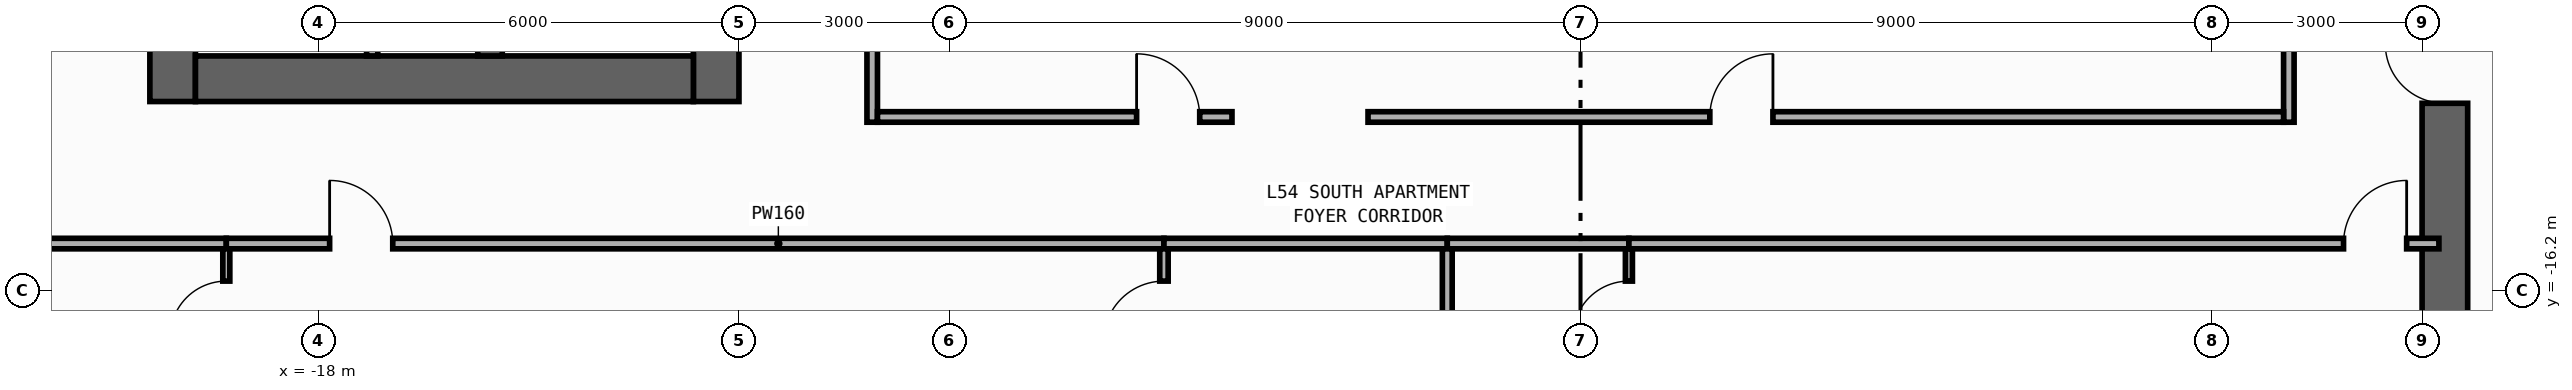
"""IFC4 building model, lengths in metres.
Left out: names, types, materials, properties, quantities, classifications, styles, units other than length and angle.
Written with IfcOpenShell. Run it as: python <this file> out.ifc"""

import sys

from ifc_helpers import new_model, si_unit, direction, frame, frame_2d, origin, place, context, subcontext, project, spatial, rectangle, extrude, element, fill, save


model = new_model("IFC4")
c1 = context("Model", 3, precision=1e-05, world=origin(), true_north=direction((0.0, 1.0)))
c2 = subcontext(c1, "Body", "Model", "MODEL_VIEW")
j1 = project(units=[si_unit("LENGTHUNIT", "METRE"), si_unit("PLANEANGLEUNIT", "RADIAN")], contexts=[c1])
p1 = place(None, origin())
s1 = spatial("IfcSite", under=j1, at=p1, CompositionType="ELEMENT")
p2 = place(p1, origin())
s2 = spatial("IfcBuilding", under=s1, at=p2, CompositionType="ELEMENT")
p3 = place(p2, frame((0.0, 0.0, 233.2)))
s3 = spatial("IfcBuildingStorey", under=s2, at=p3, CompositionType="ELEMENT", Elevation=233.2)
p4 = place(p3, frame((-20.075, -13.5, 0.0), z_axis=(0.0, 0.0, 1.0), x_axis=(0.0, 1.0, 0.0)))
e1 = element("IfcWall", 1, at=p4, inside=s3, PredefinedType="SHEAR", context=c2, shape_type="SweptSolid", body=[
    extrude(rectangle(XDim=27.0, YDim=0.65, at=frame_2d((13.5, 0.0))), origin(), (0.0, 0.0, 1.0), 3.34),
])
p5 = place(p3, frame((-12.325, -13.5, 0.0), z_axis=(0.0, 0.0, 1.0), x_axis=(0.0, 1.0, 0.0)))
e2 = element("IfcWall", 2, at=p5, inside=s3, PredefinedType="SHEAR", context=c2, shape_type="SweptSolid", body=[
    extrude(rectangle(XDim=27.0, YDim=0.65, at=frame_2d((13.5, 0.0))), origin(), (0.0, 0.0, 1.0), 3.34),
])
p6 = place(p5, frame((15.175, 0.0, 0.0)))
e3 = element("IfcOpeningElement", 3, at=p6, cuts=e2, PredefinedType="OPENING", context=c2, shape_type="SweptSolid", body=[
    extrude(rectangle(XDim=0.85, YDim=2.1, at=frame_2d((0.425, 1.05))), frame((0.0, 0.335, 0.0), z_axis=(0.0, -1.0, 0.0), x_axis=(1.0, 0.0, 0.0)), (0.0, 0.0, 1.0), 0.67),
])
p7 = place(p5, frame((21.275, 0.0, 0.0)))
e4 = element("IfcOpeningElement", 4, at=p7, cuts=e2, PredefinedType="OPENING", context=c2, shape_type="SweptSolid", body=[
    extrude(rectangle(XDim=0.85, YDim=2.1, at=frame_2d((0.425, 1.05))), frame((0.0, 0.335, 0.0), z_axis=(0.0, -1.0, 0.0), x_axis=(1.0, 0.0, 0.0)), (0.0, 0.0, 1.0), 0.67),
])
p8 = place(p5, frame((4.275, 0.0, 0.0)))
e5 = element("IfcOpeningElement", 5, at=p8, cuts=e2, PredefinedType="OPENING", context=c2, shape_type="SweptSolid", body=[
    extrude(rectangle(XDim=0.85, YDim=2.1, at=frame_2d((0.425, 1.05))), frame((0.0, 0.335, 0.0), z_axis=(0.0, -1.0, 0.0), x_axis=(1.0, 0.0, 0.0)), (0.0, 0.0, 1.0), 0.67),
])
p9 = place(p5, frame((10.275, 0.0, 0.0)))
e6 = element("IfcOpeningElement", 6, at=p9, cuts=e2, PredefinedType="OPENING", context=c2, shape_type="SweptSolid", body=[
    extrude(rectangle(XDim=0.85, YDim=2.1, at=frame_2d((0.425, 1.05))), frame((0.0, 0.335, 0.0), z_axis=(0.0, -1.0, 0.0), x_axis=(1.0, 0.0, 0.0)), (0.0, 0.0, 1.0), 0.67),
])
p10 = place(p5, frame((12.725, 0.0, 0.0)))
e7 = element("IfcOpeningElement", 7, at=p10, cuts=e2, PredefinedType="OPENING", context=c2, shape_type="SweptSolid", body=[
    extrude(rectangle(XDim=1.15, YDim=2.2, at=frame_2d((0.575, 1.1))), frame((0.0, 0.335, 0.0), z_axis=(0.0, -1.0, 0.0), x_axis=(1.0, 0.0, 0.0)), (0.0, 0.0, 1.0), 0.67),
])
p11 = place(p5, frame((1.625, 0.0, 0.0)))
e8 = element("IfcOpeningElement", 8, at=p11, cuts=e2, PredefinedType="OPENING", context=c2, shape_type="SweptSolid", body=[
    extrude(rectangle(XDim=0.85, YDim=2.1, at=frame_2d((0.425, 1.05))), frame((0.0, 0.335, 0.0), z_axis=(0.0, -1.0, 0.0), x_axis=(1.0, 0.0, 0.0)), (0.0, 0.0, 1.0), 0.67),
])
p12 = place(p3, frame((-19.75, -13.175, 0.0), z_axis=(0.0, 0.0, 1.0), x_axis=(1.0, 0.0, 0.0)))
e9 = element("IfcWall", 9, at=p12, inside=s3, PredefinedType="SHEAR", context=c2, shape_type="SweptSolid", body=[
    extrude(rectangle(XDim=7.1, YDim=0.65, at=frame_2d((3.55, 0.0))), origin(), (0.0, 0.0, 1.0), 3.34),
])
p13 = place(p3, frame((-15.55, -12.85, 0.0), z_axis=(0.0, 0.0, 1.0), x_axis=(0.0, 1.0, 0.0)))
e10 = element("IfcWall", 10, at=p13, inside=s3, PredefinedType="SHEAR", context=c2, shape_type="SweptSolid", body=[
    extrude(rectangle(XDim=25.7, YDim=0.35, at=frame_2d((12.85, 0.0))), origin(), (0.0, 0.0, 1.0), 3.34),
])
p14 = place(p13, frame((12.075, 0.0, 0.0)))
e11 = element("IfcOpeningElement", 11, at=p14, cuts=e10, PredefinedType="OPENING", context=c2, shape_type="SweptSolid", body=[
    extrude(rectangle(XDim=1.15, YDim=2.2, at=frame_2d((0.575, 1.1))), frame((0.0, 0.185, 0.0), z_axis=(0.0, -1.0, 0.0), x_axis=(1.0, 0.0, 0.0)), (0.0, 0.0, 1.0), 0.37),
])
p15 = place(p13, frame((0.975, 0.0, 0.0)))
e12 = element("IfcOpeningElement", 12, at=p15, cuts=e10, PredefinedType="OPENING", context=c2, shape_type="SweptSolid", body=[
    extrude(rectangle(XDim=0.85, YDim=2.1, at=frame_2d((0.425, 1.05))), frame((0.0, 0.185, 0.0), z_axis=(0.0, -1.0, 0.0), x_axis=(1.0, 0.0, 0.0)), (0.0, 0.0, 1.0), 0.37),
])
p16 = place(p3, frame((12.325, -19.8, 0.0), z_axis=(0.0, 0.0, 1.0), x_axis=(0.0, 1.0, 0.0)))
e13 = element("IfcWall", 13, at=p16, inside=s3, PredefinedType="SHEAR", context=c2, shape_type="SweptSolid", body=[
    extrude(rectangle(XDim=27.0, YDim=0.65, at=frame_2d((13.5, 0.0))), origin(), (0.0, 0.0, 1.0), 3.34),
])
p17 = place(p16, frame((23.05, 0.0, 0.0)))
e14 = element("IfcOpeningElement", 14, at=p17, cuts=e13, PredefinedType="OPENING", context=c2, shape_type="SweptSolid", body=[
    extrude(rectangle(XDim=1.1, YDim=2.2, at=frame_2d((0.55, 1.1))), frame((0.0, 0.335, 0.0), z_axis=(0.0, -1.0, 0.0), x_axis=(1.0, 0.0, 0.0)), (0.0, 0.0, 1.0), 0.67),
])
p18 = place(p16, frame((19.85, 0.0, 0.0)))
e15 = element("IfcOpeningElement", 15, at=p18, cuts=e13, PredefinedType="OPENING", context=c2, shape_type="SweptSolid", body=[
    extrude(rectangle(XDim=1.1, YDim=2.2, at=frame_2d((0.55, 1.1))), frame((0.0, 0.335, 0.0), z_axis=(0.0, -1.0, 0.0), x_axis=(1.0, 0.0, 0.0)), (0.0, 0.0, 1.0), 0.67),
])
p19 = place(p16, frame((16.65, 0.0, 0.0)))
e16 = element("IfcOpeningElement", 16, at=p19, cuts=e13, PredefinedType="OPENING", context=c2, shape_type="SweptSolid", body=[
    extrude(rectangle(XDim=1.1, YDim=2.2, at=frame_2d((0.55, 1.1))), frame((0.0, 0.335, 0.0), z_axis=(0.0, -1.0, 0.0), x_axis=(1.0, 0.0, 0.0)), (0.0, 0.0, 1.0), 0.67),
])
p20 = place(p16, frame((6.275, 0.0, 0.0)))
e17 = element("IfcOpeningElement", 17, at=p20, cuts=e13, PredefinedType="OPENING", context=c2, shape_type="SweptSolid", body=[
    extrude(rectangle(XDim=0.85, YDim=2.1, at=frame_2d((0.425, 1.05))), frame((0.0, 0.335, 0.0), z_axis=(0.0, -1.0, 0.0), x_axis=(1.0, 0.0, 0.0)), (0.0, 0.0, 1.0), 0.67),
])
p21 = place(p16, frame((8.575, 0.0, 0.0)))
e18 = element("IfcOpeningElement", 18, at=p21, cuts=e13, PredefinedType="OPENING", context=c2, shape_type="SweptSolid", body=[
    extrude(rectangle(XDim=0.85, YDim=2.1, at=frame_2d((0.425, 1.05))), frame((0.0, 0.335, 0.0), z_axis=(0.0, -1.0, 0.0), x_axis=(1.0, 0.0, 0.0)), (0.0, 0.0, 1.0), 0.67),
])
p22 = place(p16, frame((10.675, 0.0, 0.0)))
e19 = element("IfcOpeningElement", 19, at=p22, cuts=e13, PredefinedType="OPENING", context=c2, shape_type="SweptSolid", body=[
    extrude(rectangle(XDim=0.85, YDim=2.1, at=frame_2d((0.425, 1.05))), frame((0.0, 0.335, 0.0), z_axis=(0.0, -1.0, 0.0), x_axis=(1.0, 0.0, 0.0)), (0.0, 0.0, 1.0), 0.67),
])
p23 = place(p16, frame((12.725, 0.0, 0.0)))
e20 = element("IfcOpeningElement", 20, at=p23, cuts=e13, PredefinedType="OPENING", context=c2, shape_type="SweptSolid", body=[
    extrude(rectangle(XDim=1.15, YDim=2.2, at=frame_2d((0.575, 1.1))), frame((0.0, 0.335, 0.0), z_axis=(0.0, -1.0, 0.0), x_axis=(1.0, 0.0, 0.0)), (0.0, 0.0, 1.0), 0.67),
])
p24 = place(p16, frame((25.125, 0.0, 0.0)))
e21 = element("IfcOpeningElement", 21, at=p24, cuts=e13, PredefinedType="OPENING", context=c2, shape_type="SweptSolid", body=[
    extrude(rectangle(XDim=0.85, YDim=2.1, at=frame_2d((0.425, 1.05))), frame((0.0, 0.335, 0.0), z_axis=(0.0, -1.0, 0.0), x_axis=(1.0, 0.0, 0.0)), (0.0, 0.0, 1.0), 0.67),
])
p25 = place(p3, frame((-17.23, -12.85, 0.0), z_axis=(0.0, 0.0, 1.0), x_axis=(0.0, 1.0, 0.0)))
e22 = element("IfcWall", 22, at=p25, inside=s3, PredefinedType="PARTITIONING", context=c2, shape_type="SweptSolid", body=[
    extrude(rectangle(XDim=2.38, YDim=0.16, at=frame_2d((1.19, 0.0))), origin(), (0.0, 0.0, 1.0), 3.34),
])
p26 = place(p25, frame((0.46, 0.0, 0.0)))
e23 = element("IfcOpeningElement", 23, at=p26, cuts=e22, PredefinedType="OPENING", context=c2, shape_type="SweptSolid", body=[
    extrude(rectangle(XDim=0.85, YDim=2.1, at=frame_2d((0.425, 1.05))), frame((0.0, 0.09, 0.0), z_axis=(0.0, -1.0, 0.0), x_axis=(1.0, 0.0, 0.0)), (0.0, 0.0, 1.0), 0.18),
])
p27 = place(p3, frame((-10.1, -13.795, 0.0), z_axis=(0.0, 0.0, 1.0), x_axis=(0.0, 1.0, 0.0)))
e24 = element("IfcWall", 24, at=p27, inside=s3, PredefinedType="PARTITIONING", context=c2, shape_type="SweptSolid", body=[
    extrude(rectangle(XDim=9.005, YDim=0.15, at=frame_2d((4.502, 0.0))), origin(), (0.0, 0.0, 1.0), 3.34),
])
p28 = place(p27, frame((7.645, 0.0, 0.0)))
e25 = element("IfcOpeningElement", 25, at=p28, cuts=e24, PredefinedType="OPENING", context=c2, shape_type="SweptSolid", body=[
    extrude(rectangle(XDim=0.9, YDim=2.15, at=frame_2d((0.45, 1.075))), frame((0.0, 0.085, 0.0), z_axis=(0.0, -1.0, 0.0), x_axis=(1.0, 0.0, 0.0)), (0.0, 0.0, 1.0), 0.17),
])
p29 = place(p3, frame((10.1, -13.795, 0.0), z_axis=(0.0, 0.0, 1.0), x_axis=(0.0, 1.0, 0.0)))
e26 = element("IfcWall", 26, at=p29, inside=s3, PredefinedType="PARTITIONING", context=c2, shape_type="SweptSolid", body=[
    extrude(rectangle(XDim=6.375, YDim=0.15, at=frame_2d((3.188, 0.0))), origin(), (0.0, 0.0, 1.0), 3.34),
])
p30 = place(p29, frame((5.015, 0.0, 0.0)))
e27 = element("IfcOpeningElement", 27, at=p30, cuts=e26, PredefinedType="OPENING", context=c2, shape_type="SweptSolid", body=[
    extrude(rectangle(XDim=0.9, YDim=2.15, at=frame_2d((0.45, 1.075))), frame((0.0, 0.085, 0.0), z_axis=(0.0, -1.0, 0.0), x_axis=(1.0, 0.0, 0.0)), (0.0, 0.0, 1.0), 0.17),
])
p31 = place(p3, frame((-21.955, -15.525, 0.0), z_axis=(0.0, 0.0, 1.0), x_axis=(1.0, 0.0, 0.0)))
e28 = element("IfcWall", 28, at=p31, inside=s3, PredefinedType="PARTITIONING", context=c2, shape_type="SweptSolid", body=[
    extrude(rectangle(XDim=2.645, YDim=0.15, at=frame_2d((1.323, 0.0))), origin(), (0.0, 0.0, 1.0), 3.34),
])
p32 = place(p3, frame((-19.31, -15.525, 0.0), z_axis=(0.0, 0.0, 1.0), x_axis=(1.0, 0.0, 0.0)))
e29 = element("IfcWall", 29, at=p32, inside=s3, PredefinedType="PARTITIONING", context=c2, shape_type="SweptSolid", body=[
    extrude(rectangle(XDim=13.37, YDim=0.15, at=frame_2d((6.685, 0.0))), origin(), (0.0, 0.0, 1.0), 3.34),
])
p33 = place(p32, frame((1.473, 0.0, 0.0)))
e30 = element("IfcOpeningElement", 30, at=p33, cuts=e29, PredefinedType="OPENING", context=c2, shape_type="SweptSolid", body=[
    extrude(rectangle(XDim=0.9, YDim=2.15, at=frame_2d((0.45, 1.075))), frame((0.0, 0.085, 0.0), z_axis=(0.0, -1.0, 0.0), x_axis=(1.0, 0.0, 0.0)), (0.0, 0.0, 1.0), 0.17),
])
p34 = place(p3, frame((-5.94, -15.525, 0.0), z_axis=(0.0, 0.0, 1.0), x_axis=(1.0, 0.0, 0.0)))
e31 = element("IfcWall", 31, at=p34, inside=s3, PredefinedType="PARTITIONING", context=c2, shape_type="SweptSolid", body=[
    extrude(rectangle(XDim=4.04, YDim=0.15, at=frame_2d((2.02, 0.0))), origin(), (0.0, 0.0, 1.0), 3.34),
])
p35 = place(p3, frame((-1.9, -15.525, 0.0), z_axis=(0.0, 0.0, 1.0), x_axis=(1.0, 0.0, 0.0)))
e32 = element("IfcWall", 32, at=p35, inside=s3, PredefinedType="PARTITIONING", context=c2, shape_type="SweptSolid", body=[
    extrude(rectangle(XDim=2.59, YDim=0.15, at=frame_2d((1.295, 0.0))), origin(), (0.0, 0.0, 1.0), 3.34),
])
p36 = place(p3, frame((0.69, -15.525, 0.0), z_axis=(0.0, 0.0, 1.0), x_axis=(1.0, 0.0, 0.0)))
e33 = element("IfcWall", 33, at=p36, inside=s3, PredefinedType="PARTITIONING", context=c2, shape_type="SweptSolid", body=[
    extrude(rectangle(XDim=11.55, YDim=0.15, at=frame_2d((5.775, 0.0))), origin(), (0.0, 0.0, 1.0), 3.34),
])
p37 = place(p36, frame((10.19, 0.0, 0.0)))
e34 = element("IfcOpeningElement", 34, at=p37, cuts=e33, PredefinedType="OPENING", context=c2, shape_type="SweptSolid", body=[
    extrude(rectangle(XDim=0.9, YDim=2.15, at=frame_2d((0.45, 1.075))), frame((0.0, 0.085, 0.0), z_axis=(0.0, -1.0, 0.0), x_axis=(1.0, 0.0, 0.0)), (0.0, 0.0, 1.0), 0.17),
])
p38 = place(p3, frame((-10.025, -13.72, 0.0), z_axis=(0.0, 0.0, 1.0), x_axis=(1.0, 0.0, 0.0)))
e35 = element("IfcWall", 35, at=p38, inside=s3, PredefinedType="PARTITIONING", context=c2, shape_type="SweptSolid", body=[
    extrude(rectangle(XDim=5.055, YDim=0.15, at=frame_2d((2.527, 0.0))), origin(), (0.0, 0.0, 1.0), 3.34),
])
p39 = place(p38, frame((3.695, 0.0, 0.0)))
e36 = element("IfcOpeningElement", 36, at=p39, cuts=e35, PredefinedType="OPENING", context=c2, shape_type="SweptSolid", body=[
    extrude(rectangle(XDim=0.9, YDim=2.15, at=frame_2d((0.45, 1.075))), frame((0.0, 0.085, 0.0), z_axis=(0.0, -1.0, 0.0), x_axis=(1.0, 0.0, 0.0)), (0.0, 0.0, 1.0), 0.17),
])
p40 = place(p3, frame((-3.03, -13.72, 0.0), z_axis=(0.0, 0.0, 1.0), x_axis=(1.0, 0.0, 0.0)))
e37 = element("IfcWall", 37, at=p40, inside=s3, PredefinedType="PARTITIONING", context=c2, shape_type="SweptSolid", body=[
    extrude(rectangle(XDim=13.055, YDim=0.15, at=frame_2d((6.527, 0.0))), origin(), (0.0, 0.0, 1.0), 3.34),
])
p41 = place(p40, frame((4.874, 0.0, 0.0)))
e38 = element("IfcOpeningElement", 38, at=p41, cuts=e37, PredefinedType="OPENING", context=c2, shape_type="SweptSolid", body=[
    extrude(rectangle(XDim=0.9, YDim=2.15, at=frame_2d((0.45, 1.075))), frame((0.0, 0.085, 0.0), z_axis=(0.0, -1.0, 0.0), x_axis=(1.0, 0.0, 0.0)), (0.0, 0.0, 1.0), 0.17),
])
p42 = place(p3, frame((-19.31, -18.1, 0.0), z_axis=(0.0, 0.0, 1.0), x_axis=(0.0, 1.0, 0.0)))
e39 = element("IfcWall", 39, at=p42, inside=s3, PredefinedType="PARTITIONING", context=c2, shape_type="SweptSolid", body=[
    extrude(rectangle(XDim=2.5, YDim=0.1, at=frame_2d((1.25, 0.0))), origin(), (0.0, 0.0, 1.0), 3.34),
])
p43 = place(p42, frame((1.24, 0.0, 0.0)))
e40 = element("IfcOpeningElement", 40, at=p43, cuts=e39, PredefinedType="OPENING", context=c2, shape_type="SweptSolid", body=[
    extrude(rectangle(XDim=0.8, YDim=2.1, at=frame_2d((0.4, 1.05))), frame((0.0, 0.06, 0.0), z_axis=(0.0, -1.0, 0.0), x_axis=(1.0, 0.0, 0.0)), (0.0, 0.0, 1.0), 0.12),
])
p44 = place(p3, frame((-5.94, -20.1, 0.0), z_axis=(0.0, 0.0, 1.0), x_axis=(0.0, 1.0, 0.0)))
e41 = element("IfcWall", 41, at=p44, inside=s3, PredefinedType="PARTITIONING", context=c2, shape_type="SweptSolid", body=[
    extrude(rectangle(XDim=4.5, YDim=0.12, at=frame_2d((2.25, 0.0))), origin(), (0.0, 0.0, 1.0), 3.34),
])
p45 = place(p44, frame((3.18, 0.0, 0.0)))
e42 = element("IfcOpeningElement", 42, at=p45, cuts=e41, PredefinedType="OPENING", context=c2, shape_type="SweptSolid", body=[
    extrude(rectangle(XDim=0.86, YDim=2.15, at=frame_2d((0.43, 1.075))), frame((0.0, 0.07, 0.0), z_axis=(0.0, -1.0, 0.0), x_axis=(1.0, 0.0, 0.0)), (0.0, 0.0, 1.0), 0.14),
])
p46 = place(p3, frame((-1.9, -18.1, 0.0), z_axis=(0.0, 0.0, 1.0), x_axis=(0.0, 1.0, 0.0)))
e43 = element("IfcWall", 43, at=p46, inside=s3, PredefinedType="PARTITIONING", context=c2, shape_type="SweptSolid", body=[
    extrude(rectangle(XDim=2.5, YDim=0.14, at=frame_2d((1.25, 0.0))), origin(), (0.0, 0.0, 1.0), 3.34),
])
p47 = place(p3, frame((0.69, -18.1, 0.0), z_axis=(0.0, 0.0, 1.0), x_axis=(0.0, 1.0, 0.0)))
e44 = element("IfcWall", 44, at=p47, inside=s3, PredefinedType="PARTITIONING", context=c2, shape_type="SweptSolid", body=[
    extrude(rectangle(XDim=2.5, YDim=0.1, at=frame_2d((1.25, 0.0))), origin(), (0.0, 0.0, 1.0), 3.34),
])
p48 = place(p47, frame((1.24, 0.0, 0.0)))
e45 = element("IfcOpeningElement", 45, at=p48, cuts=e44, PredefinedType="OPENING", context=c2, shape_type="SweptSolid", body=[
    extrude(rectangle(XDim=0.8, YDim=2.1, at=frame_2d((0.4, 1.05))), frame((0.0, 0.06, 0.0), z_axis=(0.0, -1.0, 0.0), x_axis=(1.0, 0.0, 0.0)), (0.0, 0.0, 1.0), 0.12),
])
p49 = place(p20, origin())
e46 = element("IfcDoor", 46, at=p49, inside=s3, OperationType="SINGLE_SWING_RIGHT", PredefinedType="DOOR", context=c2, shape_type="SweptSolid", body=[
    extrude(rectangle(XDim=0.85, YDim=2.1, at=frame_2d((0.425, 1.05))), frame((0.0, 0.025, 0.0), z_axis=(0.0, -1.0, 0.0), x_axis=(1.0, 0.0, 0.0)), (0.0, 0.0, 1.0), 0.05),
])
fill(e17, e46)
p50 = place(p33, origin())
e47 = element("IfcDoor", 47, at=p50, inside=s3, OperationType="SINGLE_SWING_LEFT", PredefinedType="DOOR", context=c2, shape_type="SweptSolid", body=[
    extrude(rectangle(XDim=0.9, YDim=2.15, at=frame_2d((0.45, 1.075))), frame((0.0, 0.025, 0.0), z_axis=(0.0, -1.0, 0.0), x_axis=(1.0, 0.0, 0.0)), (0.0, 0.0, 1.0), 0.05),
])
fill(e30, e47)
p51 = place(p37, origin())
e48 = element("IfcDoor", 48, at=p51, inside=s3, OperationType="SINGLE_SWING_RIGHT", PredefinedType="DOOR", context=c2, shape_type="SweptSolid", body=[
    extrude(rectangle(XDim=0.9, YDim=2.15, at=frame_2d((0.45, 1.075))), frame((0.0, 0.025, 0.0), z_axis=(0.0, -1.0, 0.0), x_axis=(1.0, 0.0, 0.0)), (0.0, 0.0, 1.0), 0.05),
])
fill(e34, e48)
p52 = place(p39, origin())
e49 = element("IfcDoor", 49, at=p52, inside=s3, OperationType="SINGLE_SWING_LEFT", PredefinedType="DOOR", context=c2, shape_type="SweptSolid", body=[
    extrude(rectangle(XDim=0.9, YDim=2.15, at=frame_2d((0.45, 1.075))), frame((0.0, 0.025, 0.0), z_axis=(0.0, -1.0, 0.0), x_axis=(1.0, 0.0, 0.0)), (0.0, 0.0, 1.0), 0.05),
])
fill(e36, e49)
p53 = place(p41, origin())
e50 = element("IfcDoor", 50, at=p53, inside=s3, OperationType="SINGLE_SWING_RIGHT", PredefinedType="DOOR", context=c2, shape_type="SweptSolid", body=[
    extrude(rectangle(XDim=0.9, YDim=2.15, at=frame_2d((0.45, 1.075))), frame((0.0, 0.025, 0.0), z_axis=(0.0, -1.0, 0.0), x_axis=(1.0, 0.0, 0.0)), (0.0, 0.0, 1.0), 0.05),
])
fill(e38, e50)
p54 = place(p43, origin())
e51 = element("IfcDoor", 51, at=p54, inside=s3, OperationType="SINGLE_SWING_LEFT", PredefinedType="DOOR", context=c2, shape_type="SweptSolid", body=[
    extrude(rectangle(XDim=0.8, YDim=2.1, at=frame_2d((0.4, 1.05))), frame((0.0, 0.025, 0.0), z_axis=(0.0, -1.0, 0.0), x_axis=(1.0, 0.0, 0.0)), (0.0, 0.0, 1.0), 0.05),
])
fill(e40, e51)
p55 = place(p45, origin())
e52 = element("IfcDoor", 52, at=p55, inside=s3, OperationType="SINGLE_SWING_LEFT", PredefinedType="DOOR", context=c2, shape_type="SweptSolid", body=[
    extrude(rectangle(XDim=0.86, YDim=2.15, at=frame_2d((0.43, 1.075))), frame((0.0, 0.025, 0.0), z_axis=(0.0, -1.0, 0.0), x_axis=(1.0, 0.0, 0.0)), (0.0, 0.0, 1.0), 0.05),
])
fill(e42, e52)
p56 = place(p48, origin())
e53 = element("IfcDoor", 53, at=p56, inside=s3, OperationType="SINGLE_SWING_LEFT", PredefinedType="DOOR", context=c2, shape_type="SweptSolid", body=[
    extrude(rectangle(XDim=0.8, YDim=2.1, at=frame_2d((0.4, 1.05))), frame((0.0, 0.025, 0.0), z_axis=(0.0, -1.0, 0.0), x_axis=(1.0, 0.0, 0.0)), (0.0, 0.0, 1.0), 0.05),
])
fill(e45, e53)
save(model, sys.argv[1])
